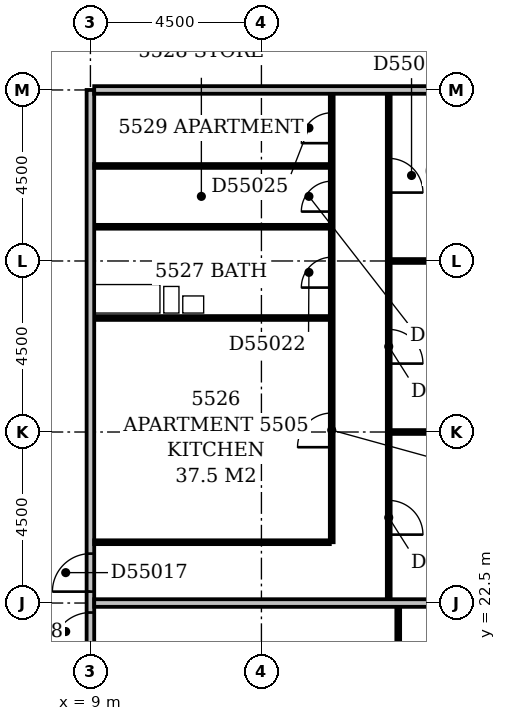
"""IFC4 building model, lengths in metres.
Left out: names, types, materials, properties, quantities, classifications, styles, units other than length and angle.
Written with IfcOpenShell. Run it as: python <this file> out.ifc"""

import sys

from ifc_helpers import new_model, si_unit, direction, frame, frame_2d, origin, place, context, subcontext, project, spatial, rectangle, extrude, element, fill, save


model = new_model("IFC4")
c1 = context("Model", 3, precision=1e-05, world=origin(), true_north=direction((0.0, 1.0)))
c2 = subcontext(c1, "Body", "Model", "MODEL_VIEW")
j1 = project(units=[si_unit("LENGTHUNIT", "METRE"), si_unit("PLANEANGLEUNIT", "RADIAN")], contexts=[c1])
p1 = place(None, origin())
s1 = spatial("IfcSite", under=j1, at=p1, CompositionType="ELEMENT")
p2 = place(p1, origin())
s2 = spatial("IfcBuilding", under=s1, at=p2, CompositionType="ELEMENT")
p3 = place(p2, frame((0.0, 0.0, 215.0)))
s3 = spatial("IfcBuildingStorey", under=s2, at=p3, CompositionType="ELEMENT", Elevation=215.0)
p4 = place(p3, frame((17.1, 17.4, 0.0), z_axis=(0.0, 0.0, 1.0), x_axis=(0.0, 1.0, 0.0)))
e1 = element("IfcWall", 1, at=p4, inside=s3, PredefinedType="PARTITIONING", context=c2, shape_type="SweptSolid", body=[
    extrude(rectangle(XDim=5.0, YDim=0.1, at=frame_2d((2.5, 0.0))), origin(), (0.0, 0.0, 1.0), 3.3),
])
p5 = place(p4, frame((2.4, 0.0, 0.0)))
e2 = element("IfcOpeningElement", 2, at=p5, cuts=e1, PredefinedType="OPENING", context=c2, shape_type="SweptSolid", body=[
    extrude(rectangle(XDim=0.9, YDim=2.1, at=frame_2d((0.45, 1.05))), frame((0.0, 0.062, 0.0), z_axis=(0.0, -1.0, 0.0), x_axis=(1.0, 0.0, 0.0)), (0.0, 0.0, 1.0), 0.124),
])
p6 = place(p3, frame((9.0, 18.45, 0.0), z_axis=(0.0, 0.0, 1.0), x_axis=(0.0, 1.0, 0.0)))
e3 = element("IfcWall", 3, at=p6, inside=s3, PredefinedType="PARTITIONING", context=c2, shape_type="SweptSolid", body=[
    extrude(rectangle(XDim=17.55, YDim=0.2, at=frame_2d((8.775, 0.0))), origin(), (0.0, 0.0, 1.0), 3.3),
])
p7 = place(p6, frame((4.35, 0.0, 0.0)))
e4 = element("IfcOpeningElement", 4, at=p7, cuts=e3, PredefinedType="OPENING", context=c2, shape_type="SweptSolid", body=[
    extrude(rectangle(XDim=1.0, YDim=2.1, at=frame_2d((0.5, 1.05))), frame((0.0, 0.112, 0.0), z_axis=(0.0, -1.0, 0.0), x_axis=(1.0, 0.0, 0.0)), (0.0, 0.0, 1.0), 0.224),
])
p8 = place(p6, frame((2.8, 0.0, 0.0)))
e5 = element("IfcOpeningElement", 5, at=p8, cuts=e3, PredefinedType="OPENING", context=c2, shape_type="SweptSolid", body=[
    extrude(rectangle(XDim=1.0, YDim=2.1, at=frame_2d((0.5, 1.05))), frame((0.0, 0.112, 0.0), z_axis=(0.0, -1.0, 0.0), x_axis=(1.0, 0.0, 0.0)), (0.0, 0.0, 1.0), 0.224),
])
p9 = place(p3, frame((9.1, 22.5, 0.0), z_axis=(0.0, 0.0, 1.0), x_axis=(1.0, 0.0, 0.0)))
e6 = element("IfcWall", 6, at=p9, inside=s3, PredefinedType="PARTITIONING", context=c2, shape_type="SweptSolid", body=[
    extrude(rectangle(XDim=12.95, YDim=0.2, at=frame_2d((6.475, 0.0))), origin(), (0.0, 0.0, 1.0), 3.3),
])
p10 = place(p3, frame((16.85, 22.6, 0.0), z_axis=(0.0, 0.0, 1.0), x_axis=(0.0, 1.0, 0.0)))
e7 = element("IfcWall", 7, at=p10, inside=s3, PredefinedType="PARTITIONING", context=c2, shape_type="SweptSolid", body=[
    extrude(rectangle(XDim=13.3, YDim=0.1, at=frame_2d((6.65, 0.0))), origin(), (0.0, 0.0, 1.0), 3.3),
])
p11 = place(p10, frame((1.7, 0.0, 0.0)))
e8 = element("IfcOpeningElement", 8, at=p11, cuts=e7, PredefinedType="OPENING", context=c2, shape_type="SweptSolid", body=[
    extrude(rectangle(XDim=0.9, YDim=2.1, at=frame_2d((0.45, 1.05))), frame((0.0, 0.062, 0.0), z_axis=(0.0, -1.0, 0.0), x_axis=(1.0, 0.0, 0.0)), (0.0, 0.0, 1.0), 0.124),
])
p12 = place(p10, frame((6.2, 0.0, 0.0)))
e9 = element("IfcOpeningElement", 9, at=p12, cuts=e7, PredefinedType="OPENING", context=c2, shape_type="SweptSolid", body=[
    extrude(rectangle(XDim=0.9, YDim=2.1, at=frame_2d((0.45, 1.05))), frame((0.0, 0.062, 0.0), z_axis=(0.0, -1.0, 0.0), x_axis=(1.0, 0.0, 0.0)), (0.0, 0.0, 1.0), 0.124),
])
p13 = place(p10, frame((10.7, 0.0, 0.0)))
e10 = element("IfcOpeningElement", 10, at=p13, cuts=e7, PredefinedType="OPENING", context=c2, shape_type="SweptSolid", body=[
    extrude(rectangle(XDim=0.9, YDim=2.1, at=frame_2d((0.45, 1.05))), frame((0.0, 0.062, 0.0), z_axis=(0.0, -1.0, 0.0), x_axis=(1.0, 0.0, 0.0)), (0.0, 0.0, 1.0), 0.124),
])
p14 = place(p3, frame((9.1, 24.1, 0.0), z_axis=(0.0, 0.0, 1.0), x_axis=(1.0, 0.0, 0.0)))
e11 = element("IfcWall", 11, at=p14, inside=s3, PredefinedType="PARTITIONING", context=c2, shape_type="SweptSolid", body=[
    extrude(rectangle(XDim=6.2, YDim=0.1, at=frame_2d((3.1, 0.0))), origin(), (0.0, 0.0, 1.0), 3.3),
])
p15 = place(p3, frame((15.35, 24.1, 0.0), z_axis=(0.0, 0.0, 1.0), x_axis=(0.0, 1.0, 0.0)))
e12 = element("IfcWall", 12, at=p15, inside=s3, PredefinedType="PARTITIONING", context=c2, shape_type="SweptSolid", body=[
    extrude(rectangle(XDim=11.8, YDim=0.1, at=frame_2d((5.9, 0.0))), origin(), (0.0, 0.0, 1.0), 3.3),
])
p16 = place(p15, frame((6.7, 0.0, 0.0)))
e13 = element("IfcOpeningElement", 13, at=p16, cuts=e12, PredefinedType="OPENING", context=c2, shape_type="SweptSolid", body=[
    extrude(rectangle(XDim=0.8, YDim=2.1, at=frame_2d((0.4, 1.05))), frame((0.0, 0.062, 0.0), z_axis=(0.0, -1.0, 0.0), x_axis=(1.0, 0.0, 0.0)), (0.0, 0.0, 1.0), 0.124),
])
p17 = place(p15, frame((2.5, 0.0, 0.0)))
e14 = element("IfcOpeningElement", 14, at=p17, cuts=e12, PredefinedType="OPENING", context=c2, shape_type="SweptSolid", body=[
    extrude(rectangle(XDim=0.9, YDim=2.1, at=frame_2d((0.45, 1.05))), frame((0.0, 0.062, 0.0), z_axis=(0.0, -1.0, 0.0), x_axis=(1.0, 0.0, 0.0)), (0.0, 0.0, 1.0), 0.124),
])
p18 = place(p15, frame((8.7, 0.0, 0.0)))
e15 = element("IfcOpeningElement", 15, at=p18, cuts=e12, PredefinedType="OPENING", context=c2, shape_type="SweptSolid", body=[
    extrude(rectangle(XDim=0.8, YDim=2.1, at=frame_2d((0.4, 1.05))), frame((0.0, 0.062, 0.0), z_axis=(0.0, -1.0, 0.0), x_axis=(1.0, 0.0, 0.0)), (0.0, 0.0, 1.0), 0.124),
])
p19 = place(p15, frame((10.5, 0.0, 0.0)))
e16 = element("IfcOpeningElement", 16, at=p19, cuts=e12, PredefinedType="OPENING", context=c2, shape_type="SweptSolid", body=[
    extrude(rectangle(XDim=0.8, YDim=2.1, at=frame_2d((0.4, 1.05))), frame((0.0, 0.062, 0.0), z_axis=(0.0, -1.0, 0.0), x_axis=(1.0, 0.0, 0.0)), (0.0, 0.0, 1.0), 0.124),
])
p20 = place(p3, frame((16.9, 27.0, 0.0), z_axis=(0.0, 0.0, 1.0), x_axis=(1.0, 0.0, 0.0)))
e17 = element("IfcWall", 17, at=p20, inside=s3, PredefinedType="PARTITIONING", context=c2, shape_type="SweptSolid", body=[
    extrude(rectangle(XDim=5.15, YDim=0.1, at=frame_2d((2.575, 0.0))), origin(), (0.0, 0.0, 1.0), 2.7),
])
p21 = place(p3, frame((9.1, 30.0, 0.0), z_axis=(0.0, 0.0, 1.0), x_axis=(1.0, 0.0, 0.0)))
e18 = element("IfcWall", 18, at=p21, inside=s3, PredefinedType="PLUMBINGWALL", context=c2, shape_type="SweptSolid", body=[
    extrude(rectangle(XDim=6.2, YDim=0.1, at=frame_2d((3.1, 0.0))), origin(), (0.0, 0.0, 1.0), 3.3),
])
p22 = place(p3, frame((16.9, 31.5, 0.0), z_axis=(0.0, 0.0, 1.0), x_axis=(1.0, 0.0, 0.0)))
e19 = element("IfcWall", 19, at=p22, inside=s3, PredefinedType="PARTITIONING", context=c2, shape_type="SweptSolid", body=[
    extrude(rectangle(XDim=5.15, YDim=0.1, at=frame_2d((2.575, 0.0))), origin(), (0.0, 0.0, 1.0), 3.3),
])
p23 = place(p3, frame((9.1, 32.4, 0.0), z_axis=(0.0, 0.0, 1.0), x_axis=(1.0, 0.0, 0.0)))
e20 = element("IfcWall", 20, at=p23, inside=s3, PredefinedType="PLUMBINGWALL", context=c2, shape_type="SweptSolid", body=[
    extrude(rectangle(XDim=6.2, YDim=0.1, at=frame_2d((3.1, 0.0))), origin(), (0.0, 0.0, 1.0), 3.3),
])
p24 = place(p3, frame((9.1, 34.0, 0.0), z_axis=(0.0, 0.0, 1.0), x_axis=(1.0, 0.0, 0.0)))
e21 = element("IfcWall", 21, at=p24, inside=s3, PredefinedType="PARTITIONING", context=c2, shape_type="SweptSolid", body=[
    extrude(rectangle(XDim=6.2, YDim=0.1, at=frame_2d((3.1, 0.0))), origin(), (0.0, 0.0, 1.0), 3.3),
])
p25 = place(p3, frame((9.1, 36.0, 0.0), z_axis=(0.0, 0.0, 1.0), x_axis=(1.0, 0.0, 0.0)))
e22 = element("IfcWall", 22, at=p25, inside=s3, PredefinedType="PARTITIONING", context=c2, shape_type="SweptSolid", body=[
    extrude(rectangle(XDim=12.95, YDim=0.2, at=frame_2d((6.475, 0.0))), origin(), (0.0, 0.0, 1.0), 3.3),
])
p26 = place(p7, origin())
e23 = element("IfcDoor", 23, at=p26, inside=s3, OperationType="SINGLE_SWING_LEFT", PredefinedType="DOOR", context=c2, shape_type="SweptSolid", body=[
    extrude(rectangle(XDim=1.0, YDim=2.1, at=frame_2d((0.5, 1.05))), frame((0.0, 0.025, 0.0), z_axis=(0.0, -1.0, 0.0), x_axis=(1.0, 0.0, 0.0)), (0.0, 0.0, 1.0), 0.05),
])
fill(e4, e23)
p27 = place(p8, origin())
e24 = element("IfcDoor", 24, at=p27, inside=s3, OperationType="SINGLE_SWING_LEFT", PredefinedType="DOOR", context=c2, shape_type="SweptSolid", body=[
    extrude(rectangle(XDim=1.0, YDim=2.1, at=frame_2d((0.5, 1.05))), frame((0.0, 0.025, 0.0), z_axis=(0.0, -1.0, 0.0), x_axis=(1.0, 0.0, 0.0)), (0.0, 0.0, 1.0), 0.05),
])
fill(e5, e24)
p28 = place(p11, frame((0.9, 0.0, 0.0), z_axis=(0.0, 0.0, 1.0), x_axis=(-1.0, 0.0, 0.0)))
e25 = element("IfcDoor", 25, at=p28, inside=s3, OperationType="SINGLE_SWING_RIGHT", PredefinedType="DOOR", context=c2, shape_type="SweptSolid", body=[
    extrude(rectangle(XDim=0.9, YDim=2.1, at=frame_2d((0.45, 1.05))), frame((0.0, 0.025, 0.0), z_axis=(0.0, -1.0, 0.0), x_axis=(1.0, 0.0, 0.0)), (0.0, 0.0, 1.0), 0.05),
])
fill(e8, e25)
p29 = place(p12, frame((0.9, 0.0, 0.0), z_axis=(0.0, 0.0, 1.0), x_axis=(-1.0, 0.0, 0.0)))
e26 = element("IfcDoor", 26, at=p29, inside=s3, OperationType="SINGLE_SWING_RIGHT", PredefinedType="DOOR", context=c2, shape_type="SweptSolid", body=[
    extrude(rectangle(XDim=0.9, YDim=2.1, at=frame_2d((0.45, 1.05))), frame((0.0, 0.025, 0.0), z_axis=(0.0, -1.0, 0.0), x_axis=(1.0, 0.0, 0.0)), (0.0, 0.0, 1.0), 0.05),
])
fill(e9, e26)
p30 = place(p13, frame((0.9, 0.0, 0.0), z_axis=(0.0, 0.0, 1.0), x_axis=(-1.0, 0.0, 0.0)))
e27 = element("IfcDoor", 27, at=p30, inside=s3, OperationType="SINGLE_SWING_RIGHT", PredefinedType="DOOR", context=c2, shape_type="SweptSolid", body=[
    extrude(rectangle(XDim=0.9, YDim=2.1, at=frame_2d((0.45, 1.05))), frame((0.0, 0.025, 0.0), z_axis=(0.0, -1.0, 0.0), x_axis=(1.0, 0.0, 0.0)), (0.0, 0.0, 1.0), 0.05),
])
fill(e10, e27)
p31 = place(p16, origin())
e28 = element("IfcDoor", 28, at=p31, inside=s3, OperationType="SINGLE_SWING_LEFT", PredefinedType="DOOR", context=c2, shape_type="SweptSolid", body=[
    extrude(rectangle(XDim=0.8, YDim=2.1, at=frame_2d((0.4, 1.05))), frame((0.0, 0.025, 0.0), z_axis=(0.0, -1.0, 0.0), x_axis=(1.0, 0.0, 0.0)), (0.0, 0.0, 1.0), 0.05),
])
fill(e13, e28)
p32 = place(p17, origin())
e29 = element("IfcDoor", 29, at=p32, inside=s3, OperationType="SINGLE_SWING_LEFT", PredefinedType="DOOR", context=c2, shape_type="SweptSolid", body=[
    extrude(rectangle(XDim=0.9, YDim=2.1, at=frame_2d((0.45, 1.05))), frame((0.0, 0.025, 0.0), z_axis=(0.0, -1.0, 0.0), x_axis=(1.0, 0.0, 0.0)), (0.0, 0.0, 1.0), 0.05),
])
fill(e14, e29)
p33 = place(p18, origin())
e30 = element("IfcDoor", 30, at=p33, inside=s3, OperationType="SINGLE_SWING_LEFT", PredefinedType="DOOR", context=c2, shape_type="SweptSolid", body=[
    extrude(rectangle(XDim=0.8, YDim=2.1, at=frame_2d((0.4, 1.05))), frame((0.0, 0.025, 0.0), z_axis=(0.0, -1.0, 0.0), x_axis=(1.0, 0.0, 0.0)), (0.0, 0.0, 1.0), 0.05),
])
fill(e15, e30)
p34 = place(p19, origin())
e31 = element("IfcDoor", 31, at=p34, inside=s3, OperationType="SINGLE_SWING_LEFT", PredefinedType="DOOR", context=c2, shape_type="SweptSolid", body=[
    extrude(rectangle(XDim=0.8, YDim=2.1, at=frame_2d((0.4, 1.05))), frame((0.0, 0.025, 0.0), z_axis=(0.0, -1.0, 0.0), x_axis=(1.0, 0.0, 0.0)), (0.0, 0.0, 1.0), 0.05),
])
fill(e16, e31)
save(model, sys.argv[1])
